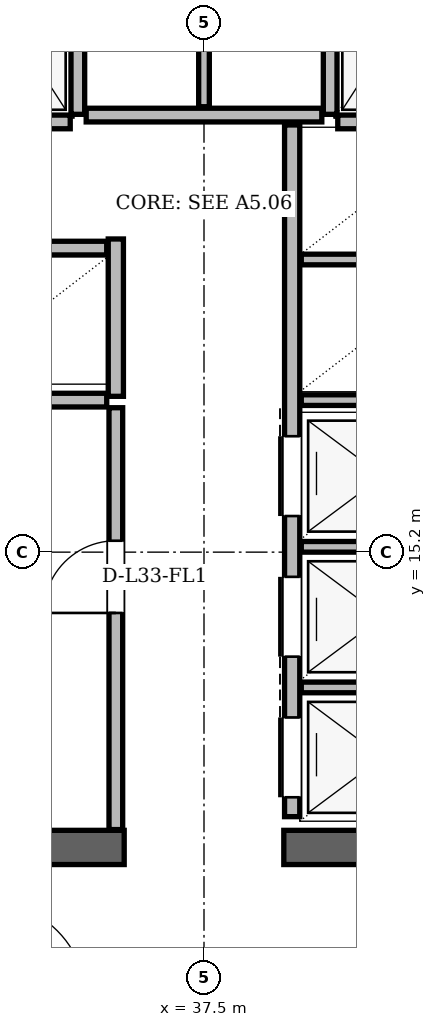
"""IFC4 building model, lengths in metres.
Left out: names, types, materials, properties, quantities, classifications, styles, units other than length and angle.
Written with IfcOpenShell. Run it as: python <this file> out.ifc"""

import sys

from ifc_helpers import new_model, si_unit, direction, frame, frame_2d, origin, place, context, subcontext, project, spatial, rectangle, extrude, element, fill, save


model = new_model("IFC4")
c1 = context("Model", 3, precision=1e-05, world=origin(), true_north=direction((0.0, 1.0)))
c2 = subcontext(c1, "Body", "Model", "MODEL_VIEW")
j1 = project(units=[si_unit("LENGTHUNIT", "METRE"), si_unit("PLANEANGLEUNIT", "RADIAN")], contexts=[c1])
p1 = place(None, origin())
s1 = spatial("IfcSite", under=j1, at=p1, CompositionType="ELEMENT")
p2 = place(p1, origin())
s2 = spatial("IfcBuilding", under=s1, at=p2, CompositionType="ELEMENT")
p3 = place(p2, frame((0.0, 0.0, 126.6)))
s3 = spatial("IfcBuildingStorey", under=s2, at=p3, CompositionType="ELEMENT", Elevation=126.6)
for number, where, z_axis, x_axis in (
    (1, (29.35, 11.315, 0.0), (0.0, 0.0, 1.0), (1.0, 0.0, 0.0)),
    (2, (38.55, 11.315, 0.0), (0.0, 0.0, 1.0), (1.0, 0.0, 0.0)),
):
    element("IfcWall", number, at=place(p3, frame(where, z_axis=z_axis, x_axis=x_axis)), inside=s3, PredefinedType="SHEAR", context=c2, shape_type="SweptSolid", body=[
        extrude(rectangle(XDim=7.1, YDim=0.45, at=frame_2d((3.55, 0.0))), origin(), (0.0, 0.0, 1.0), 3.36),
    ])
p4 = place(p3, frame((35.84, 20.96, 0.0), z_axis=(0.0, 0.0, 1.0), x_axis=(0.0, 1.0, 0.0)))
e3 = element("IfcWall", 3, at=p4, inside=s3, PredefinedType="PARTITIONING", context=c2, shape_type="SweptSolid", body=[
    extrude(rectangle(XDim=3.02, YDim=0.18, at=frame_2d((1.51, 0.0))), origin(), (0.0, 0.0, 1.0), 2.4),
])
p5 = place(p3, frame((34.16, 20.86, 0.0), z_axis=(0.0, 0.0, 1.0), x_axis=(1.0, 0.0, 0.0)))
e4 = element("IfcWall", 4, at=p5, inside=s3, PredefinedType="PARTITIONING", context=c2, shape_type="SweptSolid", body=[
    extrude(rectangle(XDim=1.58, YDim=0.18, at=frame_2d((0.79, 0.0))), origin(), (0.0, 0.0, 1.0), 3.36),
])
p6 = place(p3, frame((39.16, 20.96, 0.0), z_axis=(0.0, 0.0, 1.0), x_axis=(0.0, 1.0, 0.0)))
e5 = element("IfcWall", 5, at=p6, inside=s3, PredefinedType="PARTITIONING", context=c2, shape_type="SweptSolid", body=[
    extrude(rectangle(XDim=3.02, YDim=0.18, at=frame_2d((1.51, 0.0))), origin(), (0.0, 0.0, 1.0), 2.4),
])
p7 = place(p3, frame((39.26, 20.86, 0.0), z_axis=(0.0, 0.0, 1.0), x_axis=(1.0, 0.0, 0.0)))
e6 = element("IfcWall", 6, at=p7, inside=s3, PredefinedType="PARTITIONING", context=c2, shape_type="SweptSolid", body=[
    extrude(rectangle(XDim=1.58, YDim=0.18, at=frame_2d((0.79, 0.0))), origin(), (0.0, 0.0, 1.0), 3.36),
])
p8 = place(p3, frame((36.34, 17.25, 0.0), z_axis=(0.0, 0.0, 1.0), x_axis=(0.0, 1.0, 0.0)))
e7 = element("IfcWall", 7, at=p8, inside=s3, PredefinedType="PARTITIONING", context=c2, shape_type="SweptSolid", body=[
    extrude(rectangle(XDim=2.07, YDim=0.2, at=frame_2d((1.035, 0.0))), origin(), (0.0, 0.0, 1.0), 3.36),
])
p9 = place(p3, frame((33.95, 19.2, 0.0), z_axis=(0.0, 0.0, 1.0), x_axis=(1.0, 0.0, 0.0)))
e8 = element("IfcWall", 8, at=p9, inside=s3, PredefinedType="PARTITIONING", context=c2, shape_type="SweptSolid", body=[
    extrude(rectangle(XDim=2.27, YDim=0.18, at=frame_2d((1.135, 0.0))), origin(), (0.0, 0.0, 1.0), 3.36),
])
p10 = place(p3, frame((33.56, 17.2, 0.0), z_axis=(0.0, 0.0, 1.0), x_axis=(1.0, 0.0, 0.0)))
e9 = element("IfcWall", 9, at=p10, inside=s3, PredefinedType="PARTITIONING", context=c2, shape_type="SweptSolid", body=[
    extrude(rectangle(XDim=2.66, YDim=0.18, at=frame_2d((1.33, 0.0))), origin(), (0.0, 0.0, 1.0), 3.36),
])
p11 = place(p3, frame((36.34, 11.55, 0.0), z_axis=(0.0, 0.0, 1.0), x_axis=(0.0, 1.0, 0.0)))
e10 = element("IfcWall", 10, at=p11, inside=s3, PredefinedType="PARTITIONING", context=c2, shape_type="SweptSolid", body=[
    extrude(rectangle(XDim=5.55, YDim=0.18, at=frame_2d((2.775, 0.0))), origin(), (0.0, 0.0, 1.0), 3.36),
])
p12 = place(p11, frame((2.85, 0.0, 0.0)))
e11 = element("IfcOpeningElement", 11, at=p12, cuts=e10, PredefinedType="OPENING", context=c2, shape_type="SweptSolid", body=[
    extrude(rectangle(XDim=0.95, YDim=2.1, at=frame_2d((0.475, 1.05))), frame((0.0, 0.09, 0.0), z_axis=(0.0, -1.0, 0.0), x_axis=(1.0, 0.0, 0.0)), (0.0, 0.0, 1.0), 0.18),
])
p13 = place(p3, frame((38.66, 11.72, 0.0), z_axis=(0.0, 0.0, 1.0), x_axis=(0.0, 1.0, 0.0)))
e12 = element("IfcWall", 12, at=p13, inside=s3, PredefinedType="PARTITIONING", context=c2, shape_type="SweptSolid", body=[
    extrude(rectangle(XDim=9.1, YDim=0.2, at=frame_2d((4.55, 0.0))), origin(), (0.0, 0.0, 1.0), 3.36),
])
p14 = place(p13, frame((0.255, 0.0, 0.0)))
e13 = element("IfcOpeningElement", 13, at=p14, cuts=e12, PredefinedType="OPENING", context=c2, shape_type="SweptSolid", body=[
    extrude(rectangle(XDim=1.05, YDim=2.15, at=frame_2d((0.525, 1.075))), frame((0.0, 0.1, 0.0), z_axis=(0.0, -1.0, 0.0), x_axis=(1.0, 0.0, 0.0)), (0.0, 0.0, 1.0), 0.2),
])
p15 = place(p13, frame((2.105, 0.0, 0.0)))
e14 = element("IfcOpeningElement", 14, at=p15, cuts=e12, PredefinedType="OPENING", context=c2, shape_type="SweptSolid", body=[
    extrude(rectangle(XDim=1.05, YDim=2.15, at=frame_2d((0.525, 1.075))), frame((0.0, 0.1, 0.0), z_axis=(0.0, -1.0, 0.0), x_axis=(1.0, 0.0, 0.0)), (0.0, 0.0, 1.0), 0.2),
])
p16 = place(p13, frame((3.955, 0.0, 0.0)))
e15 = element("IfcOpeningElement", 15, at=p16, cuts=e12, PredefinedType="OPENING", context=c2, shape_type="SweptSolid", body=[
    extrude(rectangle(XDim=1.05, YDim=2.15, at=frame_2d((0.525, 1.075))), frame((0.0, 0.1, 0.0), z_axis=(0.0, -1.0, 0.0), x_axis=(1.0, 0.0, 0.0)), (0.0, 0.0, 1.0), 0.2),
])
for number, where, z_axis, x_axis in (
    (16, (38.78, 13.42, 0.0), (0.0, 0.0, 1.0), (1.0, 0.0, 0.0)),
    (17, (38.78, 15.27, 0.0), (0.0, 0.0, 1.0), (1.0, 0.0, 0.0)),
    (18, (38.78, 17.2, 0.0), (0.0, 0.0, 1.0), (1.0, 0.0, 0.0)),
    (19, (38.78, 19.05, 0.0), (0.0, 0.0, 1.0), (1.0, 0.0, 0.0)),
):
    element("IfcWall", number, at=place(p3, frame(where, z_axis=z_axis, x_axis=x_axis)), inside=s3, PredefinedType="PARTITIONING", context=c2, shape_type="SweptSolid", body=[
        extrude(rectangle(XDim=2.66, YDim=0.14, at=frame_2d((1.33, 0.0))), origin(), (0.0, 0.0, 1.0), 3.36),
    ])
p17 = place(p3, frame((35.95, 20.95, 0.0), z_axis=(0.0, 0.0, 1.0), x_axis=(1.0, 0.0, 0.0)))
e20 = element("IfcWall", 20, at=p17, inside=s3, PredefinedType="PARTITIONING", context=c2, shape_type="SweptSolid", body=[
    extrude(rectangle(XDim=3.1, YDim=0.18, at=frame_2d((1.55, 0.0))), origin(), (0.0, 0.0, 1.0), 3.36),
])
p18 = place(p3, frame((37.5, 21.06, 0.0), z_axis=(0.0, 0.0, 1.0), x_axis=(0.0, 1.0, 0.0)))
e21 = element("IfcWall", 21, at=p18, inside=s3, PredefinedType="PARTITIONING", context=c2, shape_type="SweptSolid", body=[
    extrude(rectangle(XDim=2.92, YDim=0.14, at=frame_2d((1.46, 0.0))), origin(), (0.0, 0.0, 1.0), 2.4),
])
p19 = place(p12, origin())
e22 = element("IfcDoor", 22, at=p19, inside=s3, OperationType="SINGLE_SWING_LEFT", PredefinedType="DOOR", context=c2, shape_type="SweptSolid", body=[
    extrude(rectangle(XDim=0.95, YDim=2.1, at=frame_2d((0.475, 1.05))), frame((0.0, 0.025, 0.0), z_axis=(0.0, -1.0, 0.0), x_axis=(1.0, 0.0, 0.0)), (0.0, 0.0, 1.0), 0.05),
])
fill(e11, e22)
p20 = place(p14, origin())
e23 = element("IfcDoor", 23, at=p20, inside=s3, OperationType="SLIDING_TO_RIGHT", PredefinedType="DOOR", context=c2, shape_type="SweptSolid", body=[
    extrude(rectangle(XDim=1.05, YDim=2.15, at=frame_2d((0.525, 1.075))), frame((0.0, 0.025, 0.0), z_axis=(0.0, -1.0, 0.0), x_axis=(1.0, 0.0, 0.0)), (0.0, 0.0, 1.0), 0.05),
])
fill(e13, e23)
p21 = place(p15, origin())
e24 = element("IfcDoor", 24, at=p21, inside=s3, OperationType="SLIDING_TO_LEFT", PredefinedType="DOOR", context=c2, shape_type="SweptSolid", body=[
    extrude(rectangle(XDim=1.05, YDim=2.15, at=frame_2d((0.525, 1.075))), frame((0.0, 0.025, 0.0), z_axis=(0.0, -1.0, 0.0), x_axis=(1.0, 0.0, 0.0)), (0.0, 0.0, 1.0), 0.05),
])
fill(e14, e24)
p22 = place(p16, origin())
e25 = element("IfcDoor", 25, at=p22, inside=s3, OperationType="SLIDING_TO_RIGHT", PredefinedType="DOOR", context=c2, shape_type="SweptSolid", body=[
    extrude(rectangle(XDim=1.05, YDim=2.15, at=frame_2d((0.525, 1.075))), frame((0.0, 0.025, 0.0), z_axis=(0.0, -1.0, 0.0), x_axis=(1.0, 0.0, 0.0)), (0.0, 0.0, 1.0), 0.05),
])
fill(e15, e25)
save(model, sys.argv[1])
